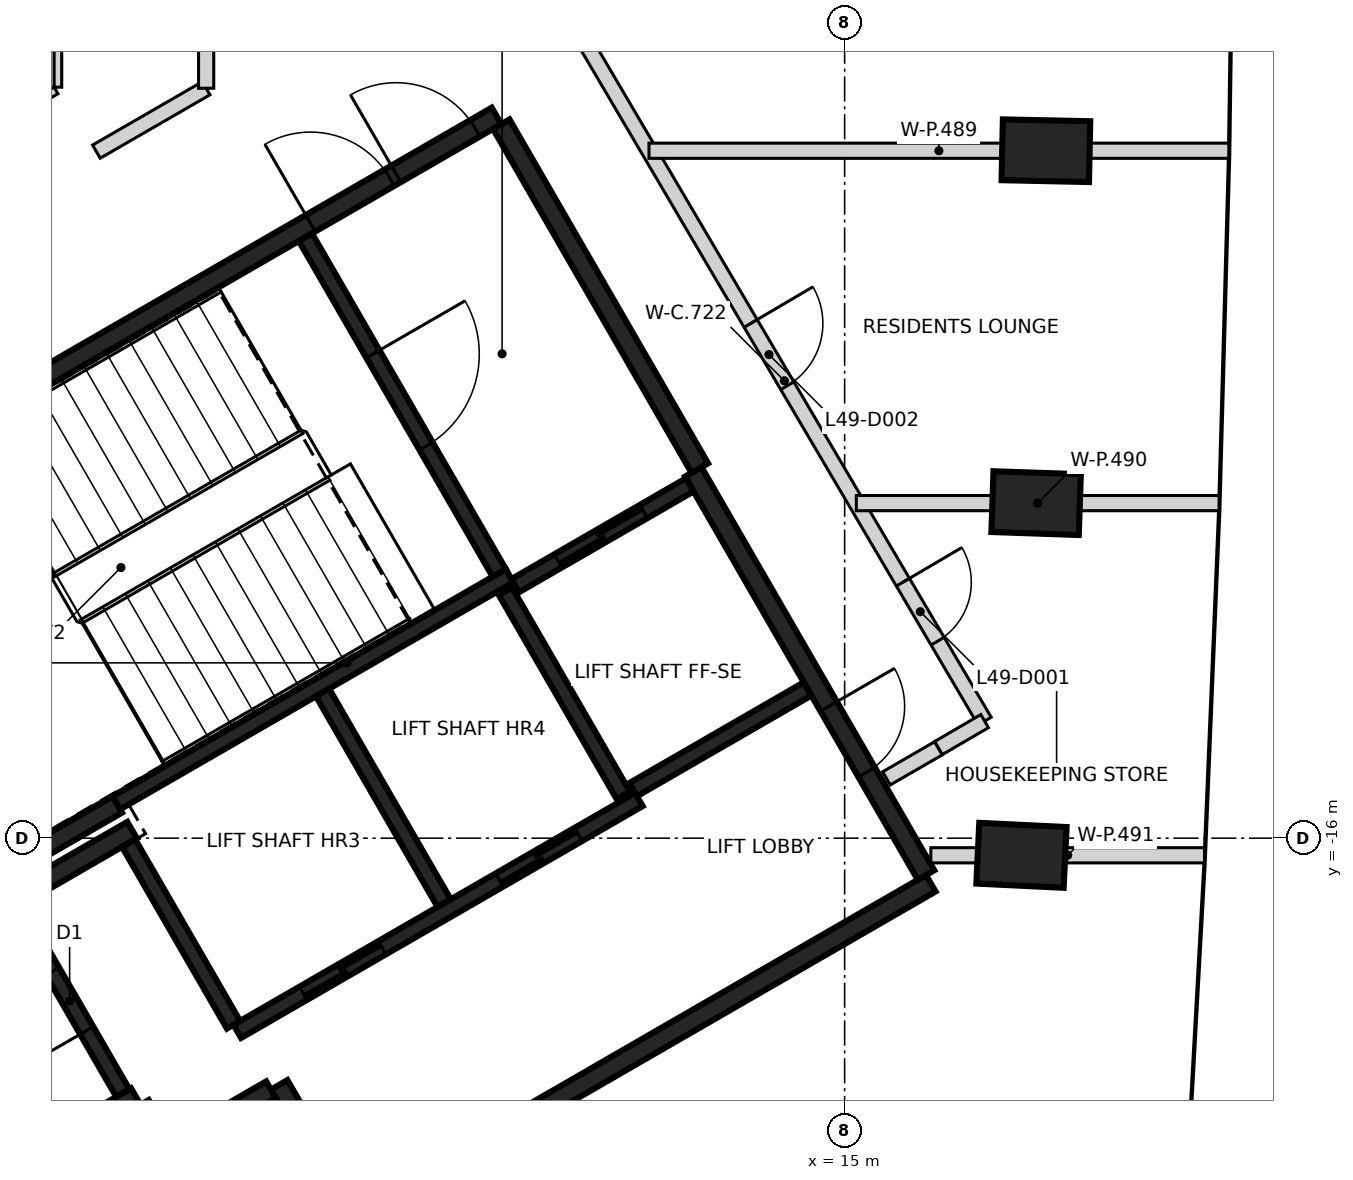
"""IFC4 building model, lengths in metres.
Left out: names, types, materials, properties, quantities, classifications, styles, units other than length and angle.
Written with IfcOpenShell. Run it as: python <this file> out.ifc"""

import sys

from ifc_helpers import new_model, si_unit, direction, frame, frame_2d, origin, origin_2d, place, context, subcontext, project, spatial, rectangle, extrude, element, fill, save


model = new_model("IFC4")
c1 = context("Model", 3, precision=1e-05, world=origin(), true_north=direction((0.0, 1.0)))
c2 = subcontext(c1, "Body", "Model", "MODEL_VIEW")
j1 = project(units=[si_unit("LENGTHUNIT", "METRE"), si_unit("PLANEANGLEUNIT", "RADIAN")], contexts=[c1])
p1 = place(None, origin())
s1 = spatial("IfcSite", under=j1, at=p1, CompositionType="ELEMENT")
p2 = place(p1, origin())
s2 = spatial("IfcBuilding", under=s1, at=p2, CompositionType="ELEMENT")
p3 = place(p2, frame((0.0, 0.0, 197.2)))
s3 = spatial("IfcBuildingStorey", under=s2, at=p3, CompositionType="ELEMENT", Elevation=197.2)
for number, where, z_axis, x_axis in (
    (1, (17.326, -16.226, -0.35), (0.0, 0.0, 1.0), (-0.999, 0.048, 0.0)),
    (2, (17.519, -11.592, -0.35), (0.0, 0.0, 1.0), (-0.999, 0.034, 0.0)),
    (3, (17.648, -6.956, -0.35), (0.0, 0.0, 1.0), (-1.0, 0.021, 0.0)),
):
    element("IfcColumn", number, at=place(p3, frame(where, z_axis=z_axis, x_axis=x_axis)), inside=s3, PredefinedType="COLUMN", context=c2, shape_type="SweptSolid", body=[
        extrude(rectangle(XDim=1.15, YDim=0.8, at=origin_2d()), origin(), (0.0, 0.0, 1.0), 3.6),
    ])
p4 = place(p3, frame((0.417, -12.273, 0.0), z_axis=(0.0, 0.0, 1.0), x_axis=(0.866021906294, 0.500006057782, 0.0)))
e4 = element("IfcWall", 4, at=p4, inside=s3, PredefinedType="SHEAR", context=c2, shape_type="SweptSolid", body=[
    extrude(rectangle(XDim=11.55, YDim=0.25, at=frame_2d((5.775, 0.0))), origin(), (0.0, 0.0, 1.0), 3.25),
])
p5 = place(p4, frame((10.025, 0.0, 0.0)))
e5 = element("IfcOpeningElement", 5, at=p5, cuts=e4, PredefinedType="OPENING", context=c2, shape_type="SweptSolid", body=[
    extrude(rectangle(XDim=1.2, YDim=2.1, at=frame_2d((0.6, 1.05))), frame((0.0, 0.135, 0.0), z_axis=(0.0, -1.0, 0.0), x_axis=(1.0, 0.0, 0.0)), (0.0, 0.0, 1.0), 0.27),
])
p6 = place(p4, frame((8.725, 0.0, 0.0)))
e6 = element("IfcOpeningElement", 6, at=p6, cuts=e4, PredefinedType="OPENING", context=c2, shape_type="SweptSolid", body=[
    extrude(rectangle(XDim=1.2, YDim=2.1, at=frame_2d((0.6, 1.05))), frame((0.0, 0.135, 0.0), z_axis=(0.0, -1.0, 0.0), x_axis=(1.0, 0.0, 0.0)), (0.0, 0.0, 1.0), 0.27),
])
p7 = place(p3, frame((16.133, -16.594, 0.0), z_axis=(0.0, 0.0, 1.0), x_axis=(-0.866022959057, -0.500004234368, 0.0)))
e7 = element("IfcWall", 7, at=p7, inside=s3, PredefinedType="SHEAR", context=c2, shape_type="SweptSolid", body=[
    extrude(rectangle(XDim=8.75, YDim=0.25, at=frame_2d((4.375, 0.0))), origin(), (0.0, 0.0, 1.0), 3.25),
])
p8 = place(p3, frame((13.008, -11.181, 0.0), z_axis=(0.0, 0.0, 1.0), x_axis=(0.500001955336, -0.866024274868, 0.0)))
e8 = element("IfcWall", 8, at=p8, inside=s3, PredefinedType="SHEAR", context=c2, shape_type="SweptSolid", body=[
    extrude(rectangle(XDim=6.125, YDim=0.25, at=frame_2d((3.062, 0.0))), origin(), (0.0, 0.0, 1.0), 3.25),
])
p9 = place(p8, frame((3.563, 0.0, 0.0)))
e9 = element("IfcOpeningElement", 9, at=p9, cuts=e8, PredefinedType="OPENING", context=c2, shape_type="SweptSolid", body=[
    extrude(rectangle(XDim=1.0, YDim=2.1, at=frame_2d((0.5, 1.05))), frame((0.0, 0.135, 0.0), z_axis=(0.0, -1.0, 0.0), x_axis=(1.0, 0.0, 0.0)), (0.0, 0.0, 1.0), 0.27),
])
p10 = place(p3, frame((10.483, -6.606, 0.0), z_axis=(0.0, 0.0, 1.0), x_axis=(0.49999885962, -0.866026062182, 0.0)))
e10 = element("IfcWall", 10, at=p10, inside=s3, PredefinedType="SHEAR", context=c2, shape_type="SweptSolid", body=[
    extrude(rectangle(XDim=5.225, YDim=0.25, at=frame_2d((2.612, 0.0))), origin(), (0.0, 0.0, 1.0), 3.25),
])
p11 = place(p3, frame((5.675, -19.399, 0.0), z_axis=(0.0, 0.0, 1.0), x_axis=(-0.866026637627, -0.499997862916, 0.0)))
e11 = element("IfcWall", 11, at=p11, inside=s3, PredefinedType="SHEAR", context=c2, shape_type="SweptSolid", body=[
    extrude(rectangle(XDim=2.865, YDim=0.25, at=frame_2d((1.432, 0.0))), origin(), (0.0, 0.0, 1.0), 3.25),
])
p12 = place(p3, frame((5.431, -15.556, 0.0), z_axis=(0.0, 0.0, 1.0), x_axis=(-0.866022940537, -0.500004266446, 0.0)))
e12 = element("IfcWall", 12, at=p12, inside=s3, PredefinedType="SHEAR", context=c2, shape_type="SweptSolid", body=[
    extrude(rectangle(XDim=2.575, YDim=0.25, at=frame_2d((1.287, 0.0))), origin(), (0.0, 0.0, 1.0), 3.25),
])
p13 = place(p3, frame((8.493, -20.86, 0.0), z_axis=(0.0, 0.0, 1.0), x_axis=(-0.500039802285, 0.866002422705, 0.0)))
e13 = element("IfcWall", 13, at=p13, inside=s3, PredefinedType="SHEAR", context=c2, shape_type="SweptSolid", body=[
    extrude(rectangle(XDim=1.865, YDim=0.25, at=frame_2d((0.932, 0.0))), origin(), (0.0, 0.0, 1.0), 3.25),
])
p14 = place(p3, frame((4.145, -16.749, 0.0), z_axis=(0.0, 0.0, 1.0), x_axis=(0.866038183914, 0.499977863513, 0.0)))
e14 = element("IfcWall", 14, at=p14, inside=s3, PredefinedType="SHEAR", context=c2, shape_type="SweptSolid", body=[
    extrude(rectangle(XDim=1.71, YDim=0.25, at=frame_2d((0.855, 0.0))), origin(), (0.0, 0.0, 1.0), 3.25),
])
p15 = place(p3, frame((7.452, -19.308, 0.0), z_axis=(0.0, 0.0, 1.0), x_axis=(-0.866044474677, -0.49996696679, 0.0)))
e15 = element("IfcWall", 15, at=p15, inside=s3, PredefinedType="SHEAR", context=c2, shape_type="SweptSolid", body=[
    extrude(rectangle(XDim=1.584, YDim=0.25, at=frame_2d((0.792, 0.0))), origin(), (0.0, 0.0, 1.0), 3.25),
])
p16 = place(p3, frame((6.017, -19.992, 0.0), z_axis=(0.0, 0.0, 1.0), x_axis=(-0.500364886717, 0.865814633822, 0.0)))
e16 = element("IfcWall", 16, at=p16, inside=s3, PredefinedType="SHEAR", context=c2, shape_type="SweptSolid", body=[
    extrude(rectangle(XDim=0.559, YDim=0.25, at=frame_2d((0.28, 0.0))), origin(), (0.0, 0.0, 1.0), 3.25),
])
p17 = place(p3, frame((5.419, -15.534, 0.0), z_axis=(0.0, 0.0, 1.0), x_axis=(0.866029065029, 0.499993658486, 0.0)))
e17 = element("IfcWall", 17, at=p17, inside=s3, PredefinedType="SHEAR", context=c2, shape_type="SweptSolid", body=[
    extrude(rectangle(XDim=5.974, YDim=0.2, at=frame_2d((2.987, 0.0))), origin(), (0.0, 0.0, 1.0), 3.25),
])
p18 = place(p3, frame((7.01, -18.542, 0.0), z_axis=(0.0, 0.0, 1.0), x_axis=(0.866030299012, 0.499991521122, 0.0)))
e18 = element("IfcWall", 18, at=p18, inside=s3, PredefinedType="SHEAR", context=c2, shape_type="SweptSolid", body=[
    extrude(rectangle(XDim=6.1, YDim=0.2, at=frame_2d((3.05, 0.0))), origin(), (0.0, 0.0, 1.0), 3.25),
])
p19 = place(p18, frame((1.0, 0.0, 0.0)))
e19 = element("IfcOpeningElement", 19, at=p19, cuts=e18, PredefinedType="OPENING", context=c2, shape_type="SweptSolid", body=[
    extrude(rectangle(XDim=1.2, YDim=2.1, at=frame_2d((0.6, 1.05))), frame((0.0, 0.11, 0.0), z_axis=(0.0, -1.0, 0.0), x_axis=(1.0, 0.0, 0.0)), (0.0, 0.0, 1.0), 0.22),
])
p20 = place(p18, frame((3.982, 0.0, 0.0)))
e20 = element("IfcOpeningElement", 20, at=p20, cuts=e18, PredefinedType="OPENING", context=c2, shape_type="SweptSolid", body=[
    extrude(rectangle(XDim=1.2, YDim=2.1, at=frame_2d((0.6, 1.05))), frame((0.0, 0.11, 0.0), z_axis=(0.0, -1.0, 0.0), x_axis=(1.0, 0.0, 0.0)), (0.0, 0.0, 1.0), 0.22),
])
p21 = place(p3, frame((7.906, -8.094, 0.0), z_axis=(0.0, 0.0, 1.0), x_axis=(0.500027839223, -0.866009330205, 0.0)))
e21 = element("IfcWall", 21, at=p21, inside=s3, PredefinedType="SHEAR", context=c2, shape_type="SweptSolid", body=[
    extrude(rectangle(XDim=5.098, YDim=0.2, at=frame_2d((2.549, 0.0))), origin(), (0.0, 0.0, 1.0), 3.25),
])
p22 = place(p21, frame((1.774, 0.0, 0.0)))
e22 = element("IfcOpeningElement", 22, at=p22, cuts=e21, PredefinedType="OPENING", context=c2, shape_type="SweptSolid", body=[
    extrude(rectangle(XDim=1.4, YDim=2.1, at=frame_2d((0.7, 1.05))), frame((0.0, 0.11, 0.0), z_axis=(0.0, -1.0, 0.0), x_axis=(1.0, 0.0, 0.0)), (0.0, 0.0, 1.0), 0.22),
])
p23 = place(p3, frame((8.132, -14.084, 0.0), z_axis=(0.0, 0.0, 1.0), x_axis=(0.499997778408, -0.866026686418, 0.0)))
e23 = element("IfcWall", 23, at=p23, inside=s3, PredefinedType="SHEAR", context=c2, shape_type="SweptSolid", body=[
    extrude(rectangle(XDim=3.198, YDim=0.2, at=frame_2d((1.599, 0.0))), origin(), (0.0, 0.0, 1.0), 3.25),
])
p24 = place(p3, frame((5.503, -19.352, 0.0), z_axis=(0.0, 0.0, 1.0), x_axis=(-0.499986818241, 0.866033014143, 0.0)))
e24 = element("IfcWall", 24, at=p24, inside=s3, PredefinedType="SHEAR", context=c2, shape_type="SweptSolid", body=[
    extrude(rectangle(XDim=2.798, YDim=0.2, at=frame_2d((1.399, 0.0))), origin(), (0.0, 0.0, 1.0), 3.25),
])
p25 = place(p24, frame((0.949, 0.0, 0.0)))
e25 = element("IfcOpeningElement", 25, at=p25, cuts=e24, PredefinedType="OPENING", context=c2, shape_type="SweptSolid", body=[
    extrude(rectangle(XDim=0.9, YDim=2.1, at=frame_2d((0.45, 1.05))), frame((0.0, 0.11, 0.0), z_axis=(0.0, -1.0, 0.0), x_axis=(1.0, 0.0, 0.0)), (0.0, 0.0, 1.0), 0.22),
])
p26 = place(p3, frame((6.96, -18.455, 0.0), z_axis=(0.0, 0.0, 1.0), x_axis=(-0.499926705758, 0.866067716099, 0.0)))
e26 = element("IfcWall", 26, at=p26, inside=s3, PredefinedType="SHEAR", context=c2, shape_type="SweptSolid", body=[
    extrude(rectangle(XDim=2.759, YDim=0.2, at=frame_2d((1.38, 0.0))), origin(), (0.0, 0.0, 1.0), 3.25),
])
p27 = place(p3, frame((12.088, -15.437, 0.0), z_axis=(0.0, 0.0, 1.0), x_axis=(-0.500026960575, 0.86600983753, 0.0)))
e27 = element("IfcWall", 27, at=p27, inside=s3, PredefinedType="SHEAR", context=c2, shape_type="SweptSolid", body=[
    extrude(rectangle(XDim=3.1, YDim=0.2, at=frame_2d((1.55, 0.0))), origin(), (0.0, 0.0, 1.0), 3.25),
])
p28 = place(p3, frame((10.666, -12.678, 0.0), z_axis=(0.0, 0.0, 1.0), x_axis=(0.866018407898, 0.500012117035, 0.0)))
e28 = element("IfcWall", 28, at=p28, inside=s3, PredefinedType="SHEAR", context=c2, shape_type="SweptSolid", body=[
    extrude(rectangle(XDim=2.651, YDim=0.2, at=frame_2d((1.325, 0.0))), origin(), (0.0, 0.0, 1.0), 3.25),
])
p29 = place(p28, frame((0.652, 0.0, 0.0)))
e29 = element("IfcOpeningElement", 29, at=p29, cuts=e28, PredefinedType="OPENING", context=c2, shape_type="SweptSolid", body=[
    extrude(rectangle(XDim=1.3, YDim=2.1, at=frame_2d((0.65, 1.05))), frame((0.0, 0.11, 0.0), z_axis=(0.0, -1.0, 0.0), x_axis=(1.0, 0.0, 0.0)), (0.0, 0.0, 1.0), 0.22),
])
p30 = place(p3, frame((14.512, -14.037, 0.0), z_axis=(0.0, 0.0, 1.0), x_axis=(-0.866018407898, -0.500012117035, 0.0)))
e30 = element("IfcWall", 30, at=p30, inside=s3, PredefinedType="SHEAR", context=c2, shape_type="SweptSolid", body=[
    extrude(rectangle(XDim=2.651, YDim=0.2, at=frame_2d((1.325, 0.0))), origin(), (0.0, 0.0, 1.0), 3.25),
])
p31 = place(p3, frame((5.156, -6.968, 0.0), z_axis=(0.0, 0.0, 1.0), x_axis=(0.865963705197, 0.500106849865, 0.0)))
e31 = element("IfcWall", 31, at=p31, inside=s3, PredefinedType="PARTITIONING", context=c2, shape_type="SweptSolid", body=[
    extrude(rectangle(XDim=1.668, YDim=0.2, at=frame_2d((0.834, 0.0))), origin(), (0.0, 0.0, 1.0), 3.25),
])
p32 = place(p3, frame((6.6, -6.134, 0.0), z_axis=(0.0, 0.0, 1.0), x_axis=(0.0, 1.0, 0.0)))
e32 = element("IfcWall", 32, at=p32, inside=s3, PredefinedType="PARTITIONING", context=c2, shape_type="SweptSolid", body=[
    extrude(rectangle(XDim=12.268, YDim=0.2, at=frame_2d((6.134, 0.0))), origin(), (0.0, 0.0, 1.0), 3.25),
])
p33 = place(p32, frame((1.463, 0.0, 0.0)))
e33 = element("IfcOpeningElement", 33, at=p33, cuts=e32, PredefinedType="OPENING", context=c2, shape_type="SweptSolid", body=[
    extrude(rectangle(XDim=0.9, YDim=2.1, at=frame_2d((0.45, 1.05))), frame((0.0, 0.11, 0.0), z_axis=(0.0, -1.0, 0.0), x_axis=(1.0, 0.0, 0.0)), (0.0, 0.0, 1.0), 0.22),
])
p34 = place(p32, frame((5.684, 0.0, 0.0)))
e34 = element("IfcOpeningElement", 34, at=p34, cuts=e32, PredefinedType="OPENING", context=c2, shape_type="SweptSolid", body=[
    extrude(rectangle(XDim=0.9, YDim=2.1, at=frame_2d((0.45, 1.05))), frame((0.0, 0.11, 0.0), z_axis=(0.0, -1.0, 0.0), x_axis=(1.0, 0.0, 0.0)), (0.0, 0.0, 1.0), 0.22),
])
p35 = place(p32, frame((9.905, 0.0, 0.0)))
e35 = element("IfcOpeningElement", 35, at=p35, cuts=e32, PredefinedType="OPENING", context=c2, shape_type="SweptSolid", body=[
    extrude(rectangle(XDim=0.9, YDim=2.1, at=frame_2d((0.45, 1.05))), frame((0.0, 0.11, 0.0), z_axis=(0.0, -1.0, 0.0), x_axis=(1.0, 0.0, 0.0)), (0.0, 0.0, 1.0), 0.22),
])
p36 = place(p3, frame((11.573, -5.504, 0.0), z_axis=(0.0, 0.0, 1.0), x_axis=(0.507120747865, -0.861875018251, 0.0)))
e36 = element("IfcWall", 36, at=p36, inside=s3, PredefinedType="PARTITIONING", context=c2, shape_type="SweptSolid", body=[
    extrude(rectangle(XDim=10.391, YDim=0.2, at=frame_2d((5.196, 0.0))), origin(), (0.0, 0.0, 1.0), 3.25),
])
p37 = place(p36, frame((8.271, 0.0, 0.0)))
e37 = element("IfcOpeningElement", 37, at=p37, cuts=e36, PredefinedType="OPENING", context=c2, shape_type="SweptSolid", body=[
    extrude(rectangle(XDim=0.9, YDim=2.1, at=frame_2d((0.45, 1.05))), frame((0.0, 0.11, 0.0), z_axis=(0.0, -1.0, 0.0), x_axis=(1.0, 0.0, 0.0)), (0.0, 0.0, 1.0), 0.22),
])
p38 = place(p36, frame((4.321, 0.0, 0.0)))
e38 = element("IfcOpeningElement", 38, at=p38, cuts=e36, PredefinedType="OPENING", context=c2, shape_type="SweptSolid", body=[
    extrude(rectangle(XDim=0.95, YDim=2.1, at=frame_2d((0.475, 1.05))), frame((0.0, 0.11, 0.0), z_axis=(0.0, -1.0, 0.0), x_axis=(1.0, 0.0, 0.0)), (0.0, 0.0, 1.0), 0.22),
])
p39 = place(p3, frame((15.55, -15.213, 0.0), z_axis=(0.0, 0.0, 1.0), x_axis=(0.865989998118, 0.500061319399, 0.0)))
e39 = element("IfcWall", 39, at=p39, inside=s3, PredefinedType="PARTITIONING", context=c2, shape_type="SweptSolid", body=[
    extrude(rectangle(XDim=0.79, YDim=0.2, at=frame_2d((0.395, 0.0))), origin(), (0.0, 0.0, 1.0), 3.25),
])
p40 = place(p3, frame((16.235, -14.814, 0.0), z_axis=(0.0, 0.0, 1.0), x_axis=(0.863804104711, 0.503827816505, 0.0)))
e40 = element("IfcWall", 40, at=p40, inside=s3, PredefinedType="PARTITIONING", context=c2, shape_type="SweptSolid", body=[
    extrude(rectangle(XDim=0.703, YDim=0.2, at=frame_2d((0.351, 0.0))), origin(), (0.0, 0.0, 1.0), 3.25),
])
p41 = place(p3, frame((3.0, -7.044, 0.0), z_axis=(0.0, 0.0, 1.0), x_axis=(0.865875248522, 0.500259986404, 0.0)))
e41 = element("IfcWall", 41, at=p41, inside=s3, PredefinedType="PARTITIONING", context=c2, shape_type="SweptSolid", body=[
    extrude(rectangle(XDim=1.848, YDim=0.2, at=frame_2d((0.924, 0.0))), origin(), (0.0, 0.0, 1.0), 3.25),
])
p42 = place(p3, frame((4.6, -6.12, 0.0), z_axis=(0.0, 0.0, 1.0), x_axis=(0.0, 1.0, 0.0)))
e42 = element("IfcWall", 42, at=p42, inside=s3, PredefinedType="PARTITIONING", context=c2, shape_type="SweptSolid", body=[
    extrude(rectangle(XDim=12.24, YDim=0.2, at=frame_2d((6.12, 0.0))), origin(), (0.0, 0.0, 1.0), 3.25),
])
p43 = place(p3, frame((12.426, -6.956, 0.0), z_axis=(0.0, 0.0, 1.0), x_axis=(1.0, 0.0, 0.0)))
e43 = element("IfcWall", 43, at=p43, inside=s3, PredefinedType="PARTITIONING", context=c2, shape_type="SweptSolid", body=[
    extrude(rectangle(XDim=7.628, YDim=0.2, at=frame_2d((3.814, 0.0))), origin(), (0.0, 0.0, 1.0), 3.25),
])
p44 = place(p3, frame((15.154, -11.592, 0.0), z_axis=(0.0, 0.0, 1.0), x_axis=(1.0, 0.0, 0.0)))
e44 = element("IfcWall", 44, at=p44, inside=s3, PredefinedType="PARTITIONING", context=c2, shape_type="SweptSolid", body=[
    extrude(rectangle(XDim=4.772, YDim=0.2, at=frame_2d((2.386, 0.0))), origin(), (0.0, 0.0, 1.0), 3.25),
])
p45 = place(p3, frame((16.134, -16.225, 0.0), z_axis=(0.0, 0.0, 1.0), x_axis=(1.0, 0.0, 0.0)))
e45 = element("IfcWall", 45, at=p45, inside=s3, PredefinedType="PARTITIONING", context=c2, shape_type="SweptSolid", body=[
    extrude(rectangle(XDim=3.6, YDim=0.2, at=frame_2d((1.8, 0.0))), origin(), (0.0, 0.0, 1.0), 3.25),
])
p46 = place(p29, origin())
e46 = element("IfcDoor", 46, at=p46, inside=s3, OperationType="SLIDING_TO_LEFT", PredefinedType="DOOR", context=c2, shape_type="SweptSolid", body=[
    extrude(rectangle(XDim=1.3, YDim=2.1, at=frame_2d((0.65, 1.05))), frame((0.0, 0.025, 0.0), z_axis=(0.0, -1.0, 0.0), x_axis=(1.0, 0.0, 0.0)), (0.0, 0.0, 1.0), 0.05),
])
fill(e29, e46)
p47 = place(p19, origin())
e47 = element("IfcDoor", 47, at=p47, inside=s3, OperationType="DOUBLE_DOOR_SLIDING", PredefinedType="DOOR", context=c2, shape_type="SweptSolid", body=[
    extrude(rectangle(XDim=1.2, YDim=2.1, at=frame_2d((0.6, 1.05))), frame((0.0, 0.025, 0.0), z_axis=(0.0, -1.0, 0.0), x_axis=(1.0, 0.0, 0.0)), (0.0, 0.0, 1.0), 0.05),
])
fill(e19, e47)
p48 = place(p20, origin())
e48 = element("IfcDoor", 48, at=p48, inside=s3, OperationType="DOUBLE_DOOR_SLIDING", PredefinedType="DOOR", context=c2, shape_type="SweptSolid", body=[
    extrude(rectangle(XDim=1.2, YDim=2.1, at=frame_2d((0.6, 1.05))), frame((0.0, 0.025, 0.0), z_axis=(0.0, -1.0, 0.0), x_axis=(1.0, 0.0, 0.0)), (0.0, 0.0, 1.0), 0.05),
])
fill(e20, e48)
p49 = place(p9, origin())
e49 = element("IfcDoor", 49, at=p49, inside=s3, OperationType="SINGLE_SWING_LEFT", PredefinedType="DOOR", context=c2, shape_type="SweptSolid", body=[
    extrude(rectangle(XDim=1.0, YDim=2.1, at=frame_2d((0.5, 1.05))), frame((0.0, 0.025, 0.0), z_axis=(0.0, -1.0, 0.0), x_axis=(1.0, 0.0, 0.0)), (0.0, 0.0, 1.0), 0.05),
])
fill(e9, e49)
p50 = place(p5, origin())
e50 = element("IfcDoor", 50, at=p50, inside=s3, OperationType="SINGLE_SWING_LEFT", PredefinedType="DOOR", context=c2, shape_type="SweptSolid", body=[
    extrude(rectangle(XDim=1.2, YDim=2.1, at=frame_2d((0.6, 1.05))), frame((0.0, 0.025, 0.0), z_axis=(0.0, -1.0, 0.0), x_axis=(1.0, 0.0, 0.0)), (0.0, 0.0, 1.0), 0.05),
])
fill(e5, e50)
p51 = place(p6, origin())
e51 = element("IfcDoor", 51, at=p51, inside=s3, OperationType="SINGLE_SWING_RIGHT", PredefinedType="DOOR", context=c2, shape_type="SweptSolid", body=[
    extrude(rectangle(XDim=1.2, YDim=2.1, at=frame_2d((0.6, 1.05))), frame((0.0, 0.025, 0.0), z_axis=(0.0, -1.0, 0.0), x_axis=(1.0, 0.0, 0.0)), (0.0, 0.0, 1.0), 0.05),
])
fill(e6, e51)
p52 = place(p22, origin())
e52 = element("IfcDoor", 52, at=p52, inside=s3, OperationType="SINGLE_SWING_LEFT", PredefinedType="DOOR", context=c2, shape_type="SweptSolid", body=[
    extrude(rectangle(XDim=1.4, YDim=2.1, at=frame_2d((0.7, 1.05))), frame((0.0, 0.025, 0.0), z_axis=(0.0, -1.0, 0.0), x_axis=(1.0, 0.0, 0.0)), (0.0, 0.0, 1.0), 0.05),
])
fill(e22, e52)
p53 = place(p25, origin())
e53 = element("IfcDoor", 53, at=p53, inside=s3, OperationType="SINGLE_SWING_RIGHT", PredefinedType="DOOR", context=c2, shape_type="SweptSolid", body=[
    extrude(rectangle(XDim=0.9, YDim=2.1, at=frame_2d((0.45, 1.05))), frame((0.0, 0.025, 0.0), z_axis=(0.0, -1.0, 0.0), x_axis=(1.0, 0.0, 0.0)), (0.0, 0.0, 1.0), 0.05),
])
fill(e25, e53)
p54 = place(p37, origin())
e54 = element("IfcDoor", 54, at=p54, inside=s3, OperationType="SINGLE_SWING_LEFT", PredefinedType="DOOR", context=c2, shape_type="SweptSolid", body=[
    extrude(rectangle(XDim=0.9, YDim=2.1, at=frame_2d((0.45, 1.05))), frame((0.0, 0.025, 0.0), z_axis=(0.0, -1.0, 0.0), x_axis=(1.0, 0.0, 0.0)), (0.0, 0.0, 1.0), 0.05),
])
fill(e37, e54)
p55 = place(p38, origin())
e55 = element("IfcDoor", 55, at=p55, inside=s3, OperationType="SINGLE_SWING_LEFT", PredefinedType="DOOR", context=c2, shape_type="SweptSolid", body=[
    extrude(rectangle(XDim=0.95, YDim=2.1, at=frame_2d((0.475, 1.05))), frame((0.0, 0.025, 0.0), z_axis=(0.0, -1.0, 0.0), x_axis=(1.0, 0.0, 0.0)), (0.0, 0.0, 1.0), 0.05),
])
fill(e38, e55)
save(model, sys.argv[1])
